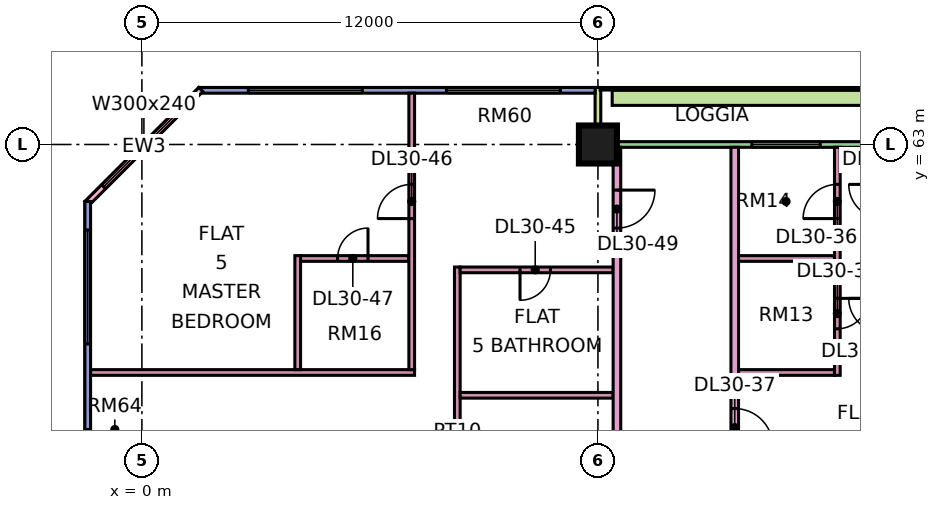
"""IFC4 building model, lengths in metres.
Left out: names, types, materials, properties, quantities, classifications, styles, units other than length and angle.
Written with IfcOpenShell. Run it as: python <this file> out.ifc"""

import sys

from ifc_helpers import new_model, si_unit, direction, frame, frame_2d, origin, origin_2d, place, context, subcontext, project, spatial, rectangle, extrude, element, fill, save


model = new_model("IFC4")
c1 = context("Model", 3, precision=1e-05, world=origin(), true_north=direction((0.0, 1.0)))
c2 = subcontext(c1, "Body", "Model", "MODEL_VIEW")
j1 = project(units=[si_unit("LENGTHUNIT", "METRE"), si_unit("PLANEANGLEUNIT", "RADIAN")], contexts=[c1])
p1 = place(None, origin())
s1 = spatial("IfcSite", under=j1, at=p1, CompositionType="ELEMENT")
p2 = place(p1, origin())
s2 = spatial("IfcBuilding", under=s1, at=p2, CompositionType="ELEMENT")
p3 = place(p2, frame((0.0, 0.0, 129.4)))
s3 = spatial("IfcBuildingStorey", under=s2, at=p3, CompositionType="ELEMENT", Elevation=129.4)
p4 = place(p3, frame((12.0, 63.0, 0.0), z_axis=(0.0, 0.0, 1.0), x_axis=(1.0, 0.0, 0.0)))
e1 = element("IfcColumn", 1, at=p4, inside=s3, PredefinedType="COLUMN", context=c2, shape_type="SweptSolid", body=[
    extrude(rectangle(XDim=1.0, YDim=1.0, at=origin_2d()), origin(), (0.0, 0.0, 1.0), 3.75),
])
p5 = place(p3, frame((22.425, 63.0, 0.0), z_axis=(0.0, 0.0, 1.0), x_axis=(-1.0, 0.0, 0.0)))
e2 = element("IfcWall", 2, at=p5, inside=s3, PredefinedType="SOLIDWALL", context=c2, shape_type="SweptSolid", body=[
    extrude(rectangle(XDim=10.35, YDim=0.15, at=frame_2d((5.175, 0.0))), origin(), (0.0, 0.0, 1.0), 3.35),
])
p6 = place(p5, frame((0.562, 0.0, 0.45)))
e3 = element("IfcOpeningElement", 3, at=p6, cuts=e2, PredefinedType="OPENING", context=c2, shape_type="SweptSolid", body=[
    extrude(rectangle(XDim=1.8, YDim=2.4, at=frame_2d((0.9, 1.2))), frame((0.0, 0.085, 0.0), z_axis=(0.0, -1.0, 0.0), x_axis=(1.0, 0.0, 0.0)), (0.0, 0.0, 1.0), 0.17),
])
p7 = place(p5, frame((4.575, 0.0, 0.45)))
e4 = element("IfcOpeningElement", 4, at=p7, cuts=e2, PredefinedType="OPENING", context=c2, shape_type="SweptSolid", body=[
    extrude(rectangle(XDim=1.8, YDim=2.4, at=frame_2d((0.9, 1.2))), frame((0.0, 0.085, 0.0), z_axis=(0.0, -1.0, 0.0), x_axis=(1.0, 0.0, 0.0)), (0.0, 0.0, 1.0), 0.17),
])
p8 = place(p3, frame((12.0, 64.5, 0.0), z_axis=(0.0, 0.0, 1.0), x_axis=(0.0, -1.0, 0.0)))
e5 = element("IfcWall", 5, at=p8, inside=s3, PredefinedType="SOLIDWALL", context=c2, shape_type="SweptSolid", body=[
    extrude(rectangle(XDim=1.5, YDim=0.15, at=frame_2d((0.75, 0.0))), origin(), (0.0, 0.0, 1.0), 3.35),
])
p9 = place(p3, frame((11.925, 64.425, 0.0), z_axis=(0.0, 0.0, 1.0), x_axis=(-1.0, 0.0, 0.0)))
e6 = element("IfcWall", 6, at=p9, inside=s3, PredefinedType="SOLIDWALL", context=c2, shape_type="SweptSolid", body=[
    extrude(rectangle(XDim=10.425, YDim=0.15, at=frame_2d((5.212, 0.0))), origin(), (0.0, 0.0, 1.0), 3.35),
])
p10 = place(p9, frame((0.913, 0.0, 0.45)))
e7 = element("IfcOpeningElement", 7, at=p10, cuts=e6, PredefinedType="OPENING", context=c2, shape_type="SweptSolid", body=[
    extrude(rectangle(XDim=3.0, YDim=2.4, at=frame_2d((1.5, 1.2))), frame((0.0, 0.085, 0.0), z_axis=(0.0, -1.0, 0.0), x_axis=(1.0, 0.0, 0.0)), (0.0, 0.0, 1.0), 0.17),
])
p11 = place(p9, frame((6.125, 0.0, 0.45)))
e8 = element("IfcOpeningElement", 8, at=p11, cuts=e6, PredefinedType="OPENING", context=c2, shape_type="SweptSolid", body=[
    extrude(rectangle(XDim=3.0, YDim=2.4, at=frame_2d((1.5, 1.2))), frame((0.0, 0.085, 0.0), z_axis=(0.0, -1.0, 0.0), x_axis=(1.0, 0.0, 0.0)), (0.0, 0.0, 1.0), 0.17),
])
p12 = place(p3, frame((1.553, 64.447, 0.0), z_axis=(0.0, 0.0, 1.0), x_axis=(-0.707106781187, -0.707106781187, 0.0)))
e9 = element("IfcWall", 9, at=p12, inside=s3, PredefinedType="SOLIDWALL", context=c2, shape_type="SweptSolid", body=[
    extrude(rectangle(XDim=4.243, YDim=0.15, at=frame_2d((2.121, 0.0))), origin(), (0.0, 0.0, 1.0), 3.35),
])
p13 = place(p12, frame((0.621, 0.0, 0.45)))
e10 = element("IfcOpeningElement", 10, at=p13, cuts=e9, PredefinedType="OPENING", context=c2, shape_type="SweptSolid", body=[
    extrude(rectangle(XDim=3.0, YDim=2.4, at=frame_2d((1.5, 1.2))), frame((0.0, 0.085, 0.0), z_axis=(0.0, -1.0, 0.0), x_axis=(1.0, 0.0, 0.0)), (0.0, 0.0, 1.0), 0.17),
])
p14 = place(p3, frame((-1.425, 61.5, 0.0), z_axis=(0.0, 0.0, 1.0), x_axis=(0.0, -1.0, 0.0)))
e11 = element("IfcWall", 11, at=p14, inside=s3, PredefinedType="SOLIDWALL", context=c2, shape_type="SweptSolid", body=[
    extrude(rectangle(XDim=13.425, YDim=0.15, at=frame_2d((6.712, 0.0))), origin(), (0.0, 0.0, 1.0), 3.35),
])
p15 = place(p14, frame((0.75, 0.0, 0.45)))
e12 = element("IfcOpeningElement", 12, at=p15, cuts=e11, PredefinedType="OPENING", context=c2, shape_type="SweptSolid", body=[
    extrude(rectangle(XDim=3.0, YDim=2.4, at=frame_2d((1.5, 1.2))), frame((0.0, 0.085, 0.0), z_axis=(0.0, -1.0, 0.0), x_axis=(1.0, 0.0, 0.0)), (0.0, 0.0, 1.0), 0.17),
])
p16 = place(p14, frame((6.0, 0.0, 0.45)))
e13 = element("IfcOpeningElement", 13, at=p16, cuts=e11, PredefinedType="OPENING", context=c2, shape_type="SweptSolid", body=[
    extrude(rectangle(XDim=3.0, YDim=2.4, at=frame_2d((1.5, 1.2))), frame((0.0, 0.085, 0.0), z_axis=(0.0, -1.0, 0.0), x_axis=(1.0, 0.0, 0.0)), (0.0, 0.0, 1.0), 0.17),
])
p17 = place(p14, frame((11.062, 0.0, 0.45)))
e14 = element("IfcOpeningElement", 14, at=p17, cuts=e11, PredefinedType="OPENING", context=c2, shape_type="SweptSolid", body=[
    extrude(rectangle(XDim=1.8, YDim=2.4, at=frame_2d((0.9, 1.2))), frame((0.0, 0.085, 0.0), z_axis=(0.0, -1.0, 0.0), x_axis=(1.0, 0.0, 0.0)), (0.0, 0.0, 1.0), 0.17),
])
p18 = place(p3, frame((22.125, 64.229, 0.0), z_axis=(0.0, 0.0, 1.0), x_axis=(-1.0, 0.0, 0.0)))
e15 = element("IfcWall", 15, at=p18, inside=s3, PredefinedType="SOLIDWALL", context=c2, shape_type="SweptSolid", body=[
    extrude(rectangle(XDim=9.75, YDim=0.4, at=frame_2d((4.875, 0.0))), origin(), (0.0, 0.0, 1.0), 0.7),
])
p19 = place(p3, frame((-1.35, 57.0, 0.0), z_axis=(0.0, 0.0, 1.0), x_axis=(1.0, 0.0, 0.0)))
e16 = element("IfcWall", 16, at=p19, inside=s3, PredefinedType="PARTITIONING", context=c2, shape_type="SweptSolid", body=[
    extrude(rectangle(XDim=8.525, YDim=0.15, at=frame_2d((4.263, 0.0))), origin(), (0.0, 0.0, 1.0), 3.35),
])
p20 = place(p3, frame((4.1, 57.075, 0.0), z_axis=(0.0, 0.0, 1.0), x_axis=(0.0, 1.0, 0.0)))
e17 = element("IfcWall", 17, at=p20, inside=s3, PredefinedType="PARTITIONING", context=c2, shape_type="SweptSolid", body=[
    extrude(rectangle(XDim=3.0, YDim=0.15, at=frame_2d((1.5, 0.0))), origin(), (0.0, 0.0, 1.0), 3.35),
])
p21 = place(p3, frame((4.175, 60.0, 0.0), z_axis=(0.0, 0.0, 1.0), x_axis=(1.0, 0.0, 0.0)))
e18 = element("IfcWall", 18, at=p21, inside=s3, PredefinedType="PARTITIONING", context=c2, shape_type="SweptSolid", body=[
    extrude(rectangle(XDim=2.85, YDim=0.15, at=frame_2d((1.425, 0.0))), origin(), (0.0, 0.0, 1.0), 3.35),
])
p22 = place(p21, frame((0.975, 0.0, 0.0)))
e19 = element("IfcOpeningElement", 19, at=p22, cuts=e18, PredefinedType="OPENING", context=c2, shape_type="SweptSolid", body=[
    extrude(rectangle(XDim=0.8, YDim=2.1, at=frame_2d((0.4, 1.05))), frame((0.0, 0.085, 0.0), z_axis=(0.0, -1.0, 0.0), x_axis=(1.0, 0.0, 0.0)), (0.0, 0.0, 1.0), 0.17),
])
p23 = place(p3, frame((7.1, 57.075, 0.0), z_axis=(0.0, 0.0, 1.0), x_axis=(0.0, 1.0, 0.0)))
e20 = element("IfcWall", 20, at=p23, inside=s3, PredefinedType="PARTITIONING", context=c2, shape_type="SweptSolid", body=[
    extrude(rectangle(XDim=7.275, YDim=0.15, at=frame_2d((3.638, 0.0))), origin(), (0.0, 0.0, 1.0), 3.35),
])
p24 = place(p23, frame((3.975, 0.0, 0.0)))
e21 = element("IfcOpeningElement", 21, at=p24, cuts=e20, PredefinedType="OPENING", context=c2, shape_type="SweptSolid", body=[
    extrude(rectangle(XDim=0.9, YDim=2.1, at=frame_2d((0.45, 1.05))), frame((0.0, 0.085, 0.0), z_axis=(0.0, -1.0, 0.0), x_axis=(1.0, 0.0, 0.0)), (0.0, 0.0, 1.0), 0.17),
])
p25 = place(p3, frame((8.3, 51.1, 0.0), z_axis=(0.0, 0.0, 1.0), x_axis=(0.0, 1.0, 0.0)))
e22 = element("IfcWall", 22, at=p25, inside=s3, PredefinedType="PARTITIONING", context=c2, shape_type="SweptSolid", body=[
    extrude(rectangle(XDim=8.675, YDim=0.15, at=frame_2d((4.337, 0.0))), origin(), (0.0, 0.0, 1.0), 3.35),
])
p26 = place(p25, frame((2.15, 0.0, 0.0)))
e23 = element("IfcOpeningElement", 23, at=p26, cuts=e22, PredefinedType="OPENING", context=c2, shape_type="SweptSolid", body=[
    extrude(rectangle(XDim=0.9, YDim=2.1, at=frame_2d((0.45, 1.05))), frame((0.0, 0.085, 0.0), z_axis=(0.0, -1.0, 0.0), x_axis=(1.0, 0.0, 0.0)), (0.0, 0.0, 1.0), 0.17),
])
p27 = place(p3, frame((8.375, 56.4, 0.0), z_axis=(0.0, 0.0, 1.0), x_axis=(1.0, 0.0, 0.0)))
e24 = element("IfcWall", 24, at=p27, inside=s3, PredefinedType="PARTITIONING", context=c2, shape_type="SweptSolid", body=[
    extrude(rectangle(XDim=4.025, YDim=0.15, at=frame_2d((2.012, 0.0))), origin(), (0.0, 0.0, 1.0), 3.35),
])
p28 = place(p3, frame((8.375, 59.7, 0.0), z_axis=(0.0, 0.0, 1.0), x_axis=(1.0, 0.0, 0.0)))
e25 = element("IfcWall", 25, at=p28, inside=s3, PredefinedType="PARTITIONING", context=c2, shape_type="SweptSolid", body=[
    extrude(rectangle(XDim=4.025, YDim=0.15, at=frame_2d((2.012, 0.0))), origin(), (0.0, 0.0, 1.0), 3.35),
])
p29 = place(p28, frame((1.575, 0.0, 0.0)))
e26 = element("IfcOpeningElement", 26, at=p29, cuts=e25, PredefinedType="OPENING", context=c2, shape_type="SweptSolid", body=[
    extrude(rectangle(XDim=0.8, YDim=2.1, at=frame_2d((0.4, 1.05))), frame((0.0, 0.085, 0.0), z_axis=(0.0, -1.0, 0.0), x_axis=(1.0, 0.0, 0.0)), (0.0, 0.0, 1.0), 0.17),
])
p30 = place(p3, frame((12.5, 20.0, 0.0), z_axis=(0.0, 0.0, 1.0), x_axis=(0.0, 1.0, 0.0)))
e27 = element("IfcWall", 27, at=p30, inside=s3, PredefinedType="PARTITIONING", context=c2, shape_type="SweptSolid", body=[
    extrude(rectangle(XDim=42.926, YDim=0.2, at=frame_2d((21.463, 0.0))), origin(), (0.0, 0.0, 1.0), 3.35),
])
p31 = place(p30, frame((17.25, 0.0, 0.0)))
e28 = element("IfcOpeningElement", 28, at=p31, cuts=e27, PredefinedType="OPENING", context=c2, shape_type="SweptSolid", body=[
    extrude(rectangle(XDim=1.0, YDim=2.1, at=frame_2d((0.5, 1.05))), frame((0.0, 0.11, 0.0), z_axis=(0.0, -1.0, 0.0), x_axis=(1.0, 0.0, 0.0)), (0.0, 0.0, 1.0), 0.22),
])
p32 = place(p30, frame((40.8, 0.0, 0.0)))
e29 = element("IfcOpeningElement", 29, at=p32, cuts=e27, PredefinedType="OPENING", context=c2, shape_type="SweptSolid", body=[
    extrude(rectangle(XDim=1.0, YDim=2.1, at=frame_2d((0.5, 1.05))), frame((0.0, 0.11, 0.0), z_axis=(0.0, -1.0, 0.0), x_axis=(1.0, 0.0, 0.0)), (0.0, 0.0, 1.0), 0.22),
])
p33 = place(p30, frame((0.6, 0.0, 0.0)))
e30 = element("IfcOpeningElement", 30, at=p33, cuts=e27, PredefinedType="OPENING", context=c2, shape_type="SweptSolid", body=[
    extrude(rectangle(XDim=1.2, YDim=2.1, at=frame_2d((0.6, 1.05))), frame((0.0, 0.11, 0.0), z_axis=(0.0, -1.0, 0.0), x_axis=(1.0, 0.0, 0.0)), (0.0, 0.0, 1.0), 0.22),
])
p34 = place(p30, frame((13.65, 0.0, 0.0)))
e31 = element("IfcOpeningElement", 31, at=p34, cuts=e27, PredefinedType="OPENING", context=c2, shape_type="SweptSolid", body=[
    extrude(rectangle(XDim=1.0, YDim=2.1, at=frame_2d((0.5, 1.05))), frame((0.0, 0.11, 0.0), z_axis=(0.0, -1.0, 0.0), x_axis=(1.0, 0.0, 0.0)), (0.0, 0.0, 1.0), 0.22),
])
p35 = place(p3, frame((15.6, 51.225, 0.0), z_axis=(0.0, 0.0, 1.0), x_axis=(0.0, 1.0, 0.0)))
e32 = element("IfcWall", 32, at=p35, inside=s3, PredefinedType="PARTITIONING", context=c2, shape_type="SweptSolid", body=[
    extrude(rectangle(XDim=11.701, YDim=0.2, at=frame_2d((5.851, 0.0))), origin(), (0.0, 0.0, 1.0), 3.35),
])
p36 = place(p35, frame((3.825, 0.0, 0.0)))
e33 = element("IfcOpeningElement", 33, at=p36, cuts=e32, PredefinedType="OPENING", context=c2, shape_type="SweptSolid", body=[
    extrude(rectangle(XDim=1.0, YDim=2.1, at=frame_2d((0.5, 1.05))), frame((0.0, 0.11, 0.0), z_axis=(0.0, -1.0, 0.0), x_axis=(1.0, 0.0, 0.0)), (0.0, 0.0, 1.0), 0.22),
])
for number, where, z_axis, x_axis in (
    (34, (15.7, 57.0, 0.0), (0.0, 0.0, 1.0), (1.0, 0.0, 0.0)),
    (35, (15.7, 60.0, 0.0), (0.0, 0.0, 1.0), (1.0, 0.0, 0.0)),
):
    element("IfcWall", number, at=place(p3, frame(where, z_axis=z_axis, x_axis=x_axis)), inside=s3, PredefinedType="PARTITIONING", context=c2, shape_type="SweptSolid", body=[
        extrude(rectangle(XDim=2.525, YDim=0.15, at=frame_2d((1.263, 0.0))), origin(), (0.0, 0.0, 1.0), 3.35),
    ])
p37 = place(p3, frame((18.3, 56.925, 0.0), z_axis=(0.0, 0.0, 1.0), x_axis=(0.0, 1.0, 0.0)))
e36 = element("IfcWall", 36, at=p37, inside=s3, PredefinedType="PARTITIONING", context=c2, shape_type="SweptSolid", body=[
    extrude(rectangle(XDim=6.001, YDim=0.15, at=frame_2d((3.0, 0.0))), origin(), (0.0, 0.0, 1.0), 3.35),
])
p38 = place(p37, frame((1.225, 0.0, 0.0)))
e37 = element("IfcOpeningElement", 37, at=p38, cuts=e36, PredefinedType="OPENING", context=c2, shape_type="SweptSolid", body=[
    extrude(rectangle(XDim=0.8, YDim=2.1, at=frame_2d((0.4, 1.05))), frame((0.0, 0.085, 0.0), z_axis=(0.0, -1.0, 0.0), x_axis=(1.0, 0.0, 0.0)), (0.0, 0.0, 1.0), 0.17),
])
p39 = place(p37, frame((4.125, 0.0, 0.0)))
e38 = element("IfcOpeningElement", 38, at=p39, cuts=e36, PredefinedType="OPENING", context=c2, shape_type="SweptSolid", body=[
    extrude(rectangle(XDim=0.9, YDim=2.1, at=frame_2d((0.45, 1.05))), frame((0.0, 0.085, 0.0), z_axis=(0.0, -1.0, 0.0), x_axis=(1.0, 0.0, 0.0)), (0.0, 0.0, 1.0), 0.17),
])
p40 = place(p7, origin())
e39 = element("IfcWindow", 39, at=p40, inside=s3, PartitioningType="SINGLE_PANEL", PredefinedType="WINDOW", context=c2, shape_type="SweptSolid", body=[
    extrude(rectangle(XDim=1.8, YDim=2.4, at=frame_2d((0.9, 1.2))), frame((0.0, 0.03, 0.0), z_axis=(0.0, -1.0, 0.0), x_axis=(1.0, 0.0, 0.0)), (0.0, 0.0, 1.0), 0.06),
])
fill(e4, e39)
p41 = place(p10, origin())
e40 = element("IfcWindow", 40, at=p41, inside=s3, PartitioningType="SINGLE_PANEL", PredefinedType="WINDOW", context=c2, shape_type="SweptSolid", body=[
    extrude(rectangle(XDim=3.0, YDim=2.4, at=frame_2d((1.5, 1.2))), frame((0.0, 0.03, 0.0), z_axis=(0.0, -1.0, 0.0), x_axis=(1.0, 0.0, 0.0)), (0.0, 0.0, 1.0), 0.06),
])
fill(e7, e40)
p42 = place(p11, origin())
e41 = element("IfcWindow", 41, at=p42, inside=s3, PartitioningType="SINGLE_PANEL", PredefinedType="WINDOW", context=c2, shape_type="SweptSolid", body=[
    extrude(rectangle(XDim=3.0, YDim=2.4, at=frame_2d((1.5, 1.2))), frame((0.0, 0.03, 0.0), z_axis=(0.0, -1.0, 0.0), x_axis=(1.0, 0.0, 0.0)), (0.0, 0.0, 1.0), 0.06),
])
fill(e8, e41)
p43 = place(p13, origin())
e42 = element("IfcWindow", 42, at=p43, inside=s3, PartitioningType="SINGLE_PANEL", PredefinedType="WINDOW", context=c2, shape_type="SweptSolid", body=[
    extrude(rectangle(XDim=3.0, YDim=2.4, at=frame_2d((1.5, 1.2))), frame((0.0, 0.03, 0.0), z_axis=(0.0, -1.0, 0.0), x_axis=(1.0, 0.0, 0.0)), (0.0, 0.0, 1.0), 0.06),
])
fill(e10, e42)
p44 = place(p15, origin())
e43 = element("IfcWindow", 43, at=p44, inside=s3, PartitioningType="SINGLE_PANEL", PredefinedType="WINDOW", context=c2, shape_type="SweptSolid", body=[
    extrude(rectangle(XDim=3.0, YDim=2.4, at=frame_2d((1.5, 1.2))), frame((0.0, 0.03, 0.0), z_axis=(0.0, -1.0, 0.0), x_axis=(1.0, 0.0, 0.0)), (0.0, 0.0, 1.0), 0.06),
])
fill(e12, e43)
p45 = place(p16, origin())
e44 = element("IfcWindow", 44, at=p45, inside=s3, PartitioningType="SINGLE_PANEL", PredefinedType="WINDOW", context=c2, shape_type="SweptSolid", body=[
    extrude(rectangle(XDim=3.0, YDim=2.4, at=frame_2d((1.5, 1.2))), frame((0.0, 0.03, 0.0), z_axis=(0.0, -1.0, 0.0), x_axis=(1.0, 0.0, 0.0)), (0.0, 0.0, 1.0), 0.06),
])
fill(e13, e44)
p46 = place(p38, origin())
e45 = element("IfcDoor", 45, at=p46, inside=s3, OperationType="SINGLE_SWING_RIGHT", PredefinedType="DOOR", context=c2, shape_type="SweptSolid", body=[
    extrude(rectangle(XDim=0.8, YDim=2.1, at=frame_2d((0.4, 1.05))), frame((0.0, 0.025, 0.0), z_axis=(0.0, -1.0, 0.0), x_axis=(1.0, 0.0, 0.0)), (0.0, 0.0, 1.0), 0.05),
])
fill(e37, e45)
p47 = place(p39, origin())
e46 = element("IfcDoor", 46, at=p47, inside=s3, OperationType="SINGLE_SWING_LEFT", PredefinedType="DOOR", context=c2, shape_type="SweptSolid", body=[
    extrude(rectangle(XDim=0.9, YDim=2.1, at=frame_2d((0.45, 1.05))), frame((0.0, 0.025, 0.0), z_axis=(0.0, -1.0, 0.0), x_axis=(1.0, 0.0, 0.0)), (0.0, 0.0, 1.0), 0.05),
])
fill(e38, e46)
p48 = place(p36, frame((1.0, 0.0, 0.0), z_axis=(0.0, 0.0, 1.0), x_axis=(-1.0, 0.0, 0.0)))
e47 = element("IfcDoor", 47, at=p48, inside=s3, OperationType="SINGLE_SWING_LEFT", PredefinedType="DOOR", context=c2, shape_type="SweptSolid", body=[
    extrude(rectangle(XDim=1.0, YDim=2.1, at=frame_2d((0.5, 1.05))), frame((0.0, 0.025, 0.0), z_axis=(0.0, -1.0, 0.0), x_axis=(1.0, 0.0, 0.0)), (0.0, 0.0, 1.0), 0.05),
])
fill(e33, e47)
p49 = place(p29, frame((0.8, 0.0, 0.0), z_axis=(0.0, 0.0, 1.0), x_axis=(-1.0, 0.0, 0.0)))
e48 = element("IfcDoor", 48, at=p49, inside=s3, OperationType="SINGLE_SWING_LEFT", PredefinedType="DOOR", context=c2, shape_type="SweptSolid", body=[
    extrude(rectangle(XDim=0.8, YDim=2.1, at=frame_2d((0.4, 1.05))), frame((0.0, 0.025, 0.0), z_axis=(0.0, -1.0, 0.0), x_axis=(1.0, 0.0, 0.0)), (0.0, 0.0, 1.0), 0.05),
])
fill(e26, e48)
p50 = place(p24, origin())
e49 = element("IfcDoor", 49, at=p50, inside=s3, OperationType="SINGLE_SWING_LEFT", PredefinedType="DOOR", context=c2, shape_type="SweptSolid", body=[
    extrude(rectangle(XDim=0.9, YDim=2.1, at=frame_2d((0.45, 1.05))), frame((0.0, 0.025, 0.0), z_axis=(0.0, -1.0, 0.0), x_axis=(1.0, 0.0, 0.0)), (0.0, 0.0, 1.0), 0.05),
])
fill(e21, e49)
p51 = place(p22, frame((0.8, 0.0, 0.0), z_axis=(0.0, 0.0, 1.0), x_axis=(-1.0, 0.0, 0.0)))
e50 = element("IfcDoor", 50, at=p51, inside=s3, OperationType="SINGLE_SWING_RIGHT", PredefinedType="DOOR", context=c2, shape_type="SweptSolid", body=[
    extrude(rectangle(XDim=0.8, YDim=2.1, at=frame_2d((0.4, 1.05))), frame((0.0, 0.025, 0.0), z_axis=(0.0, -1.0, 0.0), x_axis=(1.0, 0.0, 0.0)), (0.0, 0.0, 1.0), 0.05),
])
fill(e19, e50)
p52 = place(p32, origin())
e51 = element("IfcDoor", 51, at=p52, inside=s3, OperationType="SINGLE_SWING_RIGHT", PredefinedType="DOOR", context=c2, shape_type="SweptSolid", body=[
    extrude(rectangle(XDim=1.0, YDim=2.1, at=frame_2d((0.5, 1.05))), frame((0.0, 0.025, 0.0), z_axis=(0.0, -1.0, 0.0), x_axis=(1.0, 0.0, 0.0)), (0.0, 0.0, 1.0), 0.05),
])
fill(e29, e51)
save(model, sys.argv[1])
